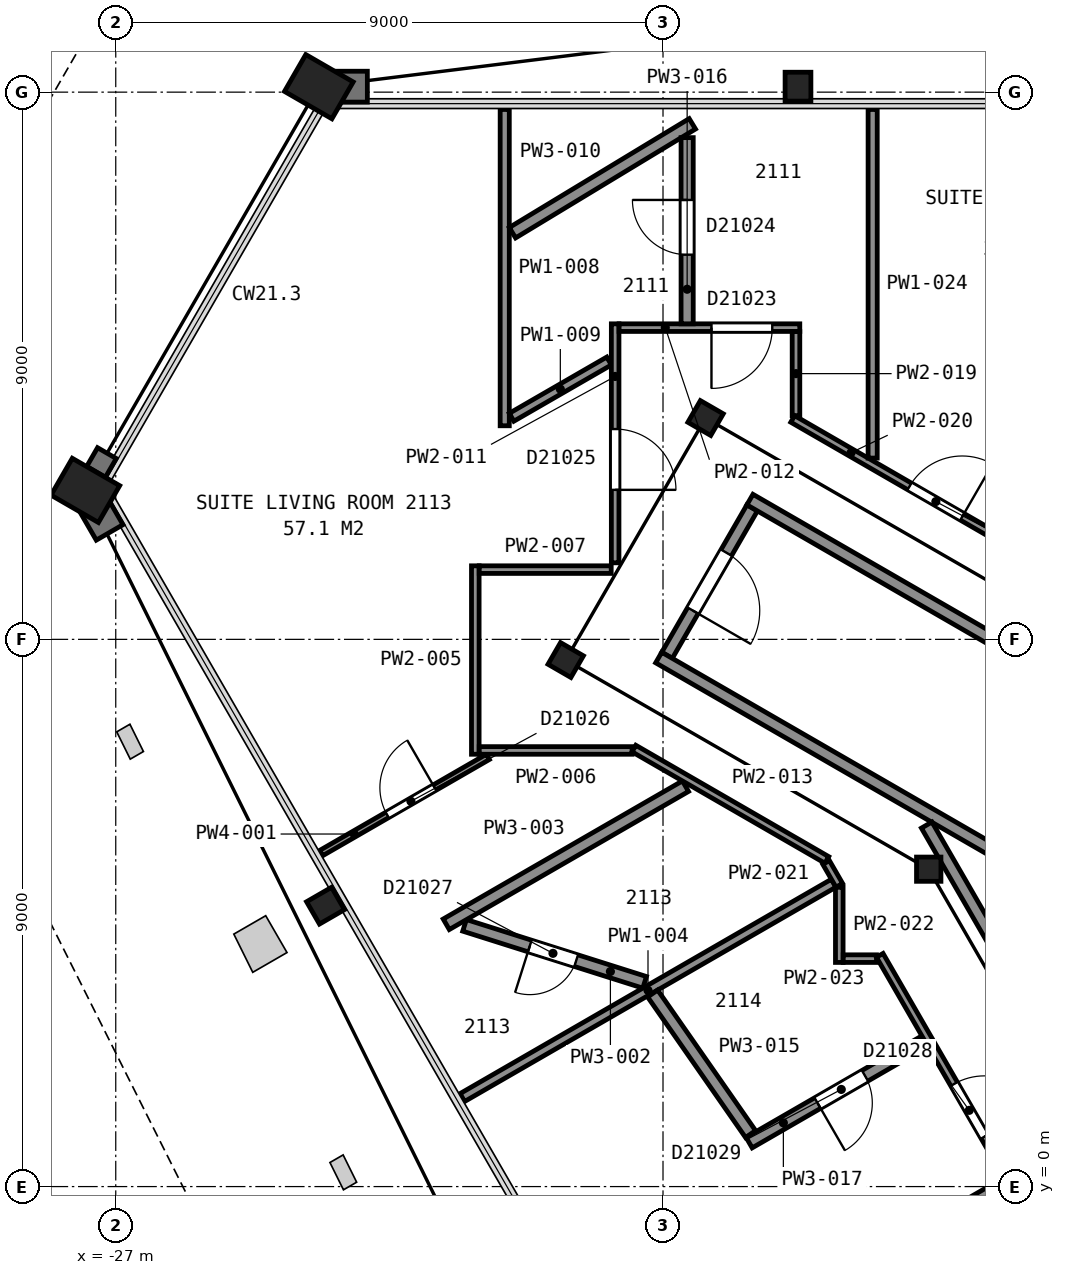
"""IFC4 building model, lengths in metres.
Left out: names, types, materials, properties, quantities, classifications, styles, units other than length and angle.
Written with IfcOpenShell. Run it as: python <this file> out.ifc"""

import sys

from ifc_helpers import new_model, si_unit, direction, frame, frame_2d, origin, origin_2d, place, context, subcontext, project, spatial, rectangle, hollow_rectangle, i_section, extrude, element, fill, save


model = new_model("IFC4")
c1 = context("Model", 3, precision=1e-05, world=origin(), true_north=direction((0.0, 1.0)))
c2 = subcontext(c1, "Body", "Model", "MODEL_VIEW")
j1 = project(units=[si_unit("LENGTHUNIT", "METRE"), si_unit("PLANEANGLEUNIT", "RADIAN")], contexts=[c1])
p1 = place(None, origin())
s1 = spatial("IfcSite", under=j1, at=p1, CompositionType="ELEMENT")
p2 = place(p1, origin())
s2 = spatial("IfcBuilding", under=s1, at=p2, CompositionType="ELEMENT")
p3 = place(p2, frame((0.0, 0.0, 92.8)))
s3 = spatial("IfcBuildingStorey", under=s2, at=p3, CompositionType="ELEMENT", Elevation=92.8)
p4 = place(p3, frame((-15.78, 18.09, 0.0), z_axis=(0.0, 0.0, 1.0), x_axis=(1.0, 0.0, 0.0)))
e1 = element("IfcColumn", 1, at=p4, inside=s3, PredefinedType="COLUMN", context=c2, shape_type="SweptSolid", body=[
    extrude(i_section(OverallWidth=0.424, OverallDepth=0.475, WebThickness=0.048, FlangeThickness=0.077, FilletRadius=0.015, at=origin_2d()), origin(), (0.0, 0.0, 1.0), 3.6),
])
for number, where, z_axis, x_axis in (
    (2, (-23.66, 18.09, 0.0), (0.0, 0.0, 1.0), (0.5, 0.866, 0.0)),
    (3, (-27.5, 11.45, 0.0), (0.0, 0.0, 1.0), (0.5, 0.866, 0.0)),
):
    element("IfcColumn", number, at=place(p3, frame(where, z_axis=z_axis, x_axis=x_axis)), inside=s3, PredefinedType="COLUMN", context=c2, shape_type="SweptSolid", body=[
        extrude(hollow_rectangle(XDim=0.7, YDim=0.9, WallThickness=0.065, at=origin_2d()), origin(), (0.0, 0.0, 1.0), 3.6),
    ])
p5 = place(p3, frame((-23.55, 4.62, 0.0), z_axis=(0.0, 0.0, 1.0), x_axis=(-0.5, 0.866025403784, 0.0)))
e4 = element("IfcColumn", 4, at=p5, inside=s3, PredefinedType="COLUMN", context=c2, shape_type="SweptSolid", body=[
    extrude(i_section(OverallWidth=0.424, OverallDepth=0.475, WebThickness=0.048, FlangeThickness=0.077, FilletRadius=0.015, at=origin_2d()), origin(), (0.0, 0.0, 1.0), 3.6),
])
for number, where, z_axis, x_axis in (
    (5, (-17.3, 12.64, 0.0), (0.0, 0.0, 1.0), (0.5, 0.866, 0.0)),
    (6, (-19.6, 8.66, 0.0), (0.0, 0.0, 1.0), (0.5, 0.866, 0.0)),
):
    element("IfcColumn", number, at=place(p3, frame(where, z_axis=z_axis, x_axis=x_axis)), inside=s3, PredefinedType="COLUMN", context=c2, shape_type="SweptSolid", body=[
        extrude(i_section(OverallWidth=0.411, OverallDepth=0.434, WebThickness=0.036, FlangeThickness=0.057, FilletRadius=0.015, at=origin_2d()), origin(), (0.0, 0.0, 1.0), 3.6),
    ])
p6 = place(p3, frame((-13.63, 5.22, 0.0), z_axis=(0.0, 0.0, 1.0), x_axis=(1.0, 0.0, 0.0)))
e7 = element("IfcColumn", 7, at=p6, inside=s3, PredefinedType="COLUMN", context=c2, shape_type="SweptSolid", body=[
    extrude(i_section(OverallWidth=0.401, OverallDepth=0.399, WebThickness=0.025, FlangeThickness=0.04, FilletRadius=0.015, at=origin_2d()), origin(), (0.0, 0.0, 1.0), 3.6),
])
p7 = place(p3, frame((-16.534, 11.162, 0.0), z_axis=(0.0, 0.0, 1.0), x_axis=(-0.49998411664, -0.866034573852, 0.0)))
e8 = element("IfcWall", 8, at=p7, inside=s3, PredefinedType="PARTITIONING", context=c2, shape_type="SweptSolid", body=[
    extrude(rectangle(XDim=2.8, YDim=0.2, at=frame_2d((1.4, 0.0))), origin(), (0.0, 0.0, 1.0), 3.35),
])
p8 = place(p7, frame((0.85, 0.0, 0.0)))
e9 = element("IfcOpeningElement", 9, at=p8, cuts=e8, PredefinedType="OPENING", context=c2, shape_type="SweptSolid", body=[
    extrude(rectangle(XDim=1.1, YDim=2.1, at=frame_2d((0.55, 1.05))), frame((0.0, 0.11, 0.0), z_axis=(0.0, -1.0, 0.0), x_axis=(1.0, 0.0, 0.0)), (0.0, 0.0, 1.0), 0.22),
])
for number, where, z_axis, x_axis in (
    (10, (-7.678, 2.701, 0.0), (0.0, 0.0, 1.0), (-0.866, 0.5, 0.0)),
    (11, (-6.178, 5.299, 0.0), (0.0, 0.0, 1.0), (-0.866, 0.5, 0.0)),
):
    element("IfcWall", number, at=place(p3, frame(where, z_axis=z_axis, x_axis=x_axis)), inside=s3, PredefinedType="PARTITIONING", context=c2, shape_type="SweptSolid", body=[
        extrude(rectangle(XDim=12.0, YDim=0.2, at=frame_2d((6.0, 0.0))), origin(), (0.0, 0.0, 1.0), 3.35),
    ])
p9 = place(p3, frame((-13.664, 5.946, 0.0), z_axis=(0.0, 0.0, 1.0), x_axis=(0.499994327219, -0.866028678941, 0.0)))
e12 = element("IfcWall", 12, at=p9, inside=s3, PredefinedType="PARTITIONING", context=c2, shape_type="SweptSolid", body=[
    extrude(rectangle(XDim=23.968, YDim=0.2, at=frame_2d((11.984, 0.0))), origin(), (0.0, 0.0, 1.0), 3.35),
])
p10 = place(p3, frame((-20.88, 7.067, 0.0), z_axis=(0.0, 0.0, 1.0), x_axis=(-0.866127794624, -0.499822611913, 0.0)))
e13 = element("IfcWall", 13, at=p10, inside=s3, PredefinedType="PARTITIONING", context=c2, shape_type="SweptSolid", body=[
    extrude(rectangle(XDim=3.165, YDim=0.1, at=frame_2d((1.583, 0.0))), origin(), (0.0, 0.0, 1.0), 2.613),
])
p11 = place(p10, frame((1.011, 0.0, 0.0)))
e14 = element("IfcOpeningElement", 14, at=p11, cuts=e13, PredefinedType="OPENING", context=c2, shape_type="SweptSolid", body=[
    extrude(rectangle(XDim=0.9, YDim=2.1, at=frame_2d((0.45, 1.05))), frame((0.0, 0.06, 0.0), z_axis=(0.0, -1.0, 0.0), x_axis=(1.0, 0.0, 0.0)), (0.0, 0.0, 1.0), 0.12),
])
p12 = place(p3, frame((-21.263, 4.296, 0.0), z_axis=(0.0, 0.0, 1.0), x_axis=(0.95341383314, -0.301665481582, 0.0)))
e15 = element("IfcWall", 15, at=p12, inside=s3, PredefinedType="PARTITIONING", context=c2, shape_type="SweptSolid", body=[
    extrude(rectangle(XDim=3.106, YDim=0.2, at=frame_2d((1.553, 0.0))), origin(), (0.0, 0.0, 1.0), 2.613),
])
p13 = place(p12, frame((1.125, 0.0, 0.0)))
e16 = element("IfcOpeningElement", 16, at=p13, cuts=e15, PredefinedType="OPENING", context=c2, shape_type="SweptSolid", body=[
    extrude(rectangle(XDim=0.8, YDim=2.1, at=frame_2d((0.4, 1.05))), frame((0.0, 0.11, 0.0), z_axis=(0.0, -1.0, 0.0), x_axis=(1.0, 0.0, 0.0)), (0.0, 0.0, 1.0), 0.22),
])
p14 = place(p3, frame((-21.565, 4.314, 0.0), z_axis=(0.0, 0.0, 1.0), x_axis=(0.866058501026, 0.499942669514, 0.0)))
e17 = element("IfcWall", 17, at=p14, inside=s3, PredefinedType="PARTITIONING", context=c2, shape_type="SweptSolid", body=[
    extrude(rectangle(XDim=4.542, YDim=0.2, at=frame_2d((2.271, 0.0))), origin(), (0.0, 0.0, 1.0), 2.613),
])
p15 = place(p3, frame((-21.301, 1.464, 0.0), z_axis=(0.0, 0.0, 1.0), x_axis=(0.866055299146, 0.49994821614, 0.0)))
e18 = element("IfcWall", 18, at=p15, inside=s3, PredefinedType="PARTITIONING", context=c2, shape_type="SweptSolid", body=[
    extrude(rectangle(XDim=7.052, YDim=0.15, at=frame_2d((3.526, 0.0))), origin(), (0.0, 0.0, 1.0), 2.613),
])
p16 = place(p3, frame((-21.087, 7.111, 0.0), z_axis=(0.0, 0.0, 1.0), x_axis=(0.0, 1.0, 0.0)))
e19 = element("IfcWall", 19, at=p16, inside=s3, PredefinedType="PARTITIONING", context=c2, shape_type="SweptSolid", body=[
    extrude(rectangle(XDim=3.099, YDim=0.125, at=frame_2d((1.549, 0.0))), origin(), (0.0, 0.0, 1.0), 2.613),
])
p17 = place(p3, frame((-21.022, 7.173, 0.0), z_axis=(0.0, 0.0, 1.0), x_axis=(1.0, 0.0, 0.0)))
e20 = element("IfcWall", 20, at=p17, inside=s3, PredefinedType="PARTITIONING", context=c2, shape_type="SweptSolid", body=[
    extrude(rectangle(XDim=2.513, YDim=0.125, at=frame_2d((1.256, 0.0))), origin(), (0.0, 0.0, 1.0), 2.613),
])
p18 = place(p3, frame((-21.022, 10.147, 0.0), z_axis=(0.0, 0.0, 1.0), x_axis=(1.0, 0.0, 0.0)))
e21 = element("IfcWall", 21, at=p18, inside=s3, PredefinedType="PARTITIONING", context=c2, shape_type="SweptSolid", body=[
    extrude(rectangle(XDim=2.17, YDim=0.125, at=frame_2d((1.085, 0.0))), origin(), (0.0, 0.0, 1.0), 2.613),
])
p19 = place(p3, frame((-20.603, 12.513, 0.0), z_axis=(0.0, 0.0, 1.0), x_axis=(0.0, 1.0, 0.0)))
e22 = element("IfcWall", 22, at=p19, inside=s3, PredefinedType="PARTITIONING", context=c2, shape_type="SweptSolid", body=[
    extrude(rectangle(XDim=5.202, YDim=0.15, at=frame_2d((2.601, 0.0))), origin(), (0.0, 0.0, 1.0), 2.613),
])
p20 = place(p3, frame((-20.49, 12.653, 0.0), z_axis=(0.0, 0.0, 1.0), x_axis=(0.866141673836, 0.499798560267, 0.0)))
e23 = element("IfcWall", 23, at=p20, inside=s3, PredefinedType="PARTITIONING", context=c2, shape_type="SweptSolid", body=[
    extrude(rectangle(XDim=1.851, YDim=0.15, at=frame_2d((0.926, 0.0))), origin(), (0.0, 0.0, 1.0), 2.613),
])
p21 = place(p3, frame((-20.476, 15.688, 0.0), z_axis=(0.0, 0.0, 1.0), x_axis=(0.855493496237, 0.517813555148, 0.0)))
e24 = element("IfcWall", 24, at=p21, inside=s3, PredefinedType="PARTITIONING", context=c2, shape_type="SweptSolid", body=[
    extrude(rectangle(XDim=3.459, YDim=0.2, at=frame_2d((1.729, 0.0))), origin(), (0.0, 0.0, 1.0), 2.613),
])
p22 = place(p3, frame((-18.787, 10.259, 0.0), z_axis=(0.0, 0.0, 1.0), x_axis=(0.0, 1.0, 0.0)))
e25 = element("IfcWall", 25, at=p22, inside=s3, PredefinedType="PARTITIONING", context=c2, shape_type="SweptSolid", body=[
    extrude(rectangle(XDim=3.93, YDim=0.125, at=frame_2d((1.965, 0.0))), origin(), (0.0, 0.0, 1.0), 2.613),
])
p23 = place(p22, frame((1.2, 0.0, 0.0)))
e26 = element("IfcOpeningElement", 26, at=p23, cuts=e25, PredefinedType="OPENING", context=c2, shape_type="SweptSolid", body=[
    extrude(rectangle(XDim=1.0, YDim=2.1, at=frame_2d((0.5, 1.05))), frame((0.0, 0.073, 0.0), z_axis=(0.0, -1.0, 0.0), x_axis=(1.0, 0.0, 0.0)), (0.0, 0.0, 1.0), 0.145),
])
p24 = place(p3, frame((-18.722, 14.127, 0.0), z_axis=(0.0, 0.0, 1.0), x_axis=(1.0, 0.0, 0.0)))
e27 = element("IfcWall", 27, at=p24, inside=s3, PredefinedType="PARTITIONING", context=c2, shape_type="SweptSolid", body=[
    extrude(rectangle(XDim=2.971, YDim=0.125, at=frame_2d((1.486, 0.0))), origin(), (0.0, 0.0, 1.0), 2.613),
])
p25 = place(p24, frame((1.519, 0.0, 0.0)))
e28 = element("IfcOpeningElement", 28, at=p25, cuts=e27, PredefinedType="OPENING", context=c2, shape_type="SweptSolid", body=[
    extrude(rectangle(XDim=1.0, YDim=2.1, at=frame_2d((0.5, 1.05))), frame((0.0, 0.073, 0.0), z_axis=(0.0, -1.0, 0.0), x_axis=(1.0, 0.0, 0.0)), (0.0, 0.0, 1.0), 0.145),
])
p26 = place(p3, frame((-18.478, 7.204, 0.0), z_axis=(0.0, 0.0, 1.0), x_axis=(0.866011320536, -0.500024392108, 0.0)))
e29 = element("IfcWall", 29, at=p26, inside=s3, PredefinedType="PARTITIONING", context=c2, shape_type="SweptSolid", body=[
    extrude(rectangle(XDim=3.663, YDim=0.125, at=frame_2d((1.832, 0.0))), origin(), (0.0, 0.0, 1.0), 2.613),
])
p27 = place(p3, frame((-18.466, -3.445, 0.0), z_axis=(0.0, 0.0, 1.0), x_axis=(0.86605175433, 0.499954356739, 0.0)))
e30 = element("IfcWall", 30, at=p27, inside=s3, PredefinedType="PARTITIONING", context=c2, shape_type="SweptSolid", body=[
    extrude(rectangle(XDim=7.048, YDim=0.15, at=frame_2d((3.524, 0.0))), origin(), (0.0, 0.0, 1.0), 2.613),
])
p28 = place(p3, frame((-18.17, 3.175, 0.0), z_axis=(0.0, 0.0, 1.0), x_axis=(0.571541682724, -0.820573034476, 0.0)))
e31 = element("IfcWall", 31, at=p28, inside=s3, PredefinedType="PARTITIONING", context=c2, shape_type="SweptSolid", body=[
    extrude(rectangle(XDim=2.818, YDim=0.2, at=frame_2d((1.409, 0.0))), origin(), (0.0, 0.0, 1.0), 2.613),
])
p29 = place(p3, frame((-17.603, 14.189, 0.0), z_axis=(0.0, 0.0, 1.0), x_axis=(0.0, 1.0, 0.0)))
e32 = element("IfcWall", 32, at=p29, inside=s3, PredefinedType="PARTITIONING", context=c2, shape_type="SweptSolid", body=[
    extrude(rectangle(XDim=3.062, YDim=0.2, at=frame_2d((1.531, 0.0))), origin(), (0.0, 0.0, 1.0), 2.613),
])
p30 = place(p29, frame((1.137, 0.0, 0.0)))
e33 = element("IfcOpeningElement", 33, at=p30, cuts=e32, PredefinedType="OPENING", context=c2, shape_type="SweptSolid", body=[
    extrude(rectangle(XDim=0.9, YDim=2.1, at=frame_2d((0.45, 1.05))), frame((0.0, 0.11, 0.0), z_axis=(0.0, -1.0, 0.0), x_axis=(1.0, 0.0, 0.0)), (0.0, 0.0, 1.0), 0.22),
])
p31 = place(p3, frame((-16.583, 0.723, 0.0), z_axis=(0.0, 0.0, 1.0), x_axis=(0.866001642064, 0.500041154249, 0.0)))
e34 = element("IfcWall", 34, at=p31, inside=s3, PredefinedType="PARTITIONING", context=c2, shape_type="SweptSolid", body=[
    extrude(rectangle(XDim=3.338, YDim=0.2, at=frame_2d((1.669, 0.0))), origin(), (0.0, 0.0, 1.0), 2.613),
])
p32 = place(p31, frame((1.3, 0.0, 0.0)))
e35 = element("IfcOpeningElement", 35, at=p32, cuts=e34, PredefinedType="OPENING", context=c2, shape_type="SweptSolid", body=[
    extrude(rectangle(XDim=0.9, YDim=2.1, at=frame_2d((0.45, 1.05))), frame((0.0, 0.11, 0.0), z_axis=(0.0, -1.0, 0.0), x_axis=(1.0, 0.0, 0.0)), (0.0, 0.0, 1.0), 0.22),
])
p33 = place(p3, frame((-15.813, 12.679, 0.0), z_axis=(0.0, 0.0, 1.0), x_axis=(0.0, 1.0, 0.0)))
e36 = element("IfcWall", 36, at=p33, inside=s3, PredefinedType="PARTITIONING", context=c2, shape_type="SweptSolid", body=[
    extrude(rectangle(XDim=1.383, YDim=0.125, at=frame_2d((0.691, 0.0))), origin(), (0.0, 0.0, 1.0), 2.613),
])
p34 = place(p3, frame((-15.867, 12.625, 0.0), z_axis=(0.0, 0.0, 1.0), x_axis=(0.86603035395, -0.499991425964, 0.0)))
e37 = element("IfcWall", 37, at=p34, inside=s3, PredefinedType="PARTITIONING", context=c2, shape_type="SweptSolid", body=[
    extrude(rectangle(XDim=3.824, YDim=0.125, at=frame_2d((1.912, 0.0))), origin(), (0.0, 0.0, 1.0), 2.613),
])
p35 = place(p34, frame((2.219, 0.0, 0.0)))
e38 = element("IfcOpeningElement", 38, at=p35, cuts=e37, PredefinedType="OPENING", context=c2, shape_type="SweptSolid", body=[
    extrude(rectangle(XDim=1.0, YDim=2.1, at=frame_2d((0.5, 1.05))), frame((0.0, 0.073, 0.0), z_axis=(0.0, -1.0, 0.0), x_axis=(1.0, 0.0, 0.0)), (0.0, 0.0, 1.0), 0.145),
])
p36 = place(p3, frame((-15.318, 5.33, 0.0), z_axis=(0.0, 0.0, 1.0), x_axis=(0.499836277606, -0.86611990832, 0.0)))
e39 = element("IfcWall", 39, at=p36, inside=s3, PredefinedType="PARTITIONING", context=c2, shape_type="SweptSolid", body=[
    extrude(rectangle(XDim=0.433, YDim=0.125, at=frame_2d((0.217, 0.0))), origin(), (0.0, 0.0, 1.0), 2.613),
])
p37 = place(p3, frame((-15.101, 3.687, 0.0), z_axis=(0.0, 0.0, 1.0), x_axis=(0.0, 1.0, 0.0)))
e40 = element("IfcWall", 40, at=p37, inside=s3, PredefinedType="PARTITIONING", context=c2, shape_type="SweptSolid", body=[
    extrude(rectangle(XDim=1.236, YDim=0.125, at=frame_2d((0.618, 0.0))), origin(), (0.0, 0.0, 1.0), 2.613),
])
p38 = place(p3, frame((-15.036, 3.749, 0.0), z_axis=(0.0, 0.0, 1.0), x_axis=(1.0, 0.0, 0.0)))
e41 = element("IfcWall", 41, at=p38, inside=s3, PredefinedType="PARTITIONING", context=c2, shape_type="SweptSolid", body=[
    extrude(rectangle(XDim=0.547, YDim=0.125, at=frame_2d((0.273, 0.0))), origin(), (0.0, 0.0, 1.0), 2.613),
])
p39 = place(p3, frame((-14.552, 11.981, 0.0), z_axis=(0.0, 0.0, 1.0), x_axis=(0.0, 1.0, 0.0)))
e42 = element("IfcWall", 42, at=p39, inside=s3, PredefinedType="PARTITIONING", context=c2, shape_type="SweptSolid", body=[
    extrude(rectangle(XDim=5.734, YDim=0.15, at=frame_2d((2.867, 0.0))), origin(), (0.0, 0.0, 1.0), 2.613),
])
p40 = place(p3, frame((-9.41, -4.902, 0.0), z_axis=(0.0, 0.0, 1.0), x_axis=(-0.499971244726, 0.866042005013, 0.0)))
e43 = element("IfcWall", 43, at=p40, inside=s3, PredefinedType="PARTITIONING", context=c2, shape_type="SweptSolid", body=[
    extrude(rectangle(XDim=10.052, YDim=0.125, at=frame_2d((5.026, 0.0))), origin(), (0.0, 0.0, 1.0), 2.613),
])
p41 = place(p40, frame((6.608, 0.0, 0.0)))
e44 = element("IfcOpeningElement", 44, at=p41, cuts=e43, PredefinedType="OPENING", context=c2, shape_type="SweptSolid", body=[
    extrude(rectangle(XDim=1.0, YDim=2.1, at=frame_2d((0.5, 1.05))), frame((0.0, 0.073, 0.0), z_axis=(0.0, -1.0, 0.0), x_axis=(1.0, 0.0, 0.0)), (0.0, 0.0, 1.0), 0.145),
])
p42 = place(p40, frame((2.989, 0.0, 0.0)))
e45 = element("IfcOpeningElement", 45, at=p42, cuts=e43, PredefinedType="OPENING", context=c2, shape_type="SweptSolid", body=[
    extrude(rectangle(XDim=1.0, YDim=2.1, at=frame_2d((0.5, 1.05))), frame((0.0, 0.073, 0.0), z_axis=(0.0, -1.0, 0.0), x_axis=(1.0, 0.0, 0.0)), (0.0, 0.0, 1.0), 0.145),
])
p43 = place(p8, origin())
e46 = element("IfcDoor", 46, at=p43, inside=s3, OperationType="SINGLE_SWING_RIGHT", PredefinedType="DOOR", context=c2, shape_type="SweptSolid", body=[
    extrude(rectangle(XDim=1.1, YDim=2.1, at=frame_2d((0.55, 1.05))), frame((0.0, 0.025, 0.0), z_axis=(0.0, -1.0, 0.0), x_axis=(1.0, 0.0, 0.0)), (0.0, 0.0, 1.0), 0.05),
])
fill(e9, e46)
p44 = place(p11, origin())
e47 = element("IfcDoor", 47, at=p44, inside=s3, OperationType="SINGLE_SWING_LEFT", PredefinedType="DOOR", context=c2, shape_type="SweptSolid", body=[
    extrude(rectangle(XDim=0.9, YDim=2.1, at=frame_2d((0.45, 1.05))), frame((0.0, 0.025, 0.0), z_axis=(0.0, -1.0, 0.0), x_axis=(1.0, 0.0, 0.0)), (0.0, 0.0, 1.0), 0.05),
])
fill(e14, e47)
p45 = place(p13, origin())
e48 = element("IfcDoor", 48, at=p45, inside=s3, OperationType="SINGLE_SWING_LEFT", PredefinedType="DOOR", context=c2, shape_type="SweptSolid", body=[
    extrude(rectangle(XDim=0.8, YDim=2.1, at=frame_2d((0.4, 1.05))), frame((0.0, 0.025, 0.0), z_axis=(0.0, -1.0, 0.0), x_axis=(1.0, 0.0, 0.0)), (0.0, 0.0, 1.0), 0.05),
])
fill(e16, e48)
p46 = place(p23, origin())
e49 = element("IfcDoor", 49, at=p46, inside=s3, OperationType="SINGLE_SWING_LEFT", PredefinedType="DOOR", context=c2, shape_type="SweptSolid", body=[
    extrude(rectangle(XDim=1.0, YDim=2.1, at=frame_2d((0.5, 1.05))), frame((0.0, 0.025, 0.0), z_axis=(0.0, -1.0, 0.0), x_axis=(1.0, 0.0, 0.0)), (0.0, 0.0, 1.0), 0.05),
])
fill(e26, e49)
p47 = place(p25, origin())
e50 = element("IfcDoor", 50, at=p47, inside=s3, OperationType="SINGLE_SWING_LEFT", PredefinedType="DOOR", context=c2, shape_type="SweptSolid", body=[
    extrude(rectangle(XDim=1.0, YDim=2.1, at=frame_2d((0.5, 1.05))), frame((0.0, 0.025, 0.0), z_axis=(0.0, -1.0, 0.0), x_axis=(1.0, 0.0, 0.0)), (0.0, 0.0, 1.0), 0.05),
])
fill(e28, e50)
p48 = place(p30, origin())
e51 = element("IfcDoor", 51, at=p48, inside=s3, OperationType="SINGLE_SWING_RIGHT", PredefinedType="DOOR", context=c2, shape_type="SweptSolid", body=[
    extrude(rectangle(XDim=0.9, YDim=2.1, at=frame_2d((0.45, 1.05))), frame((0.0, 0.025, 0.0), z_axis=(0.0, -1.0, 0.0), x_axis=(1.0, 0.0, 0.0)), (0.0, 0.0, 1.0), 0.05),
])
fill(e33, e51)
p49 = place(p32, origin())
e52 = element("IfcDoor", 52, at=p49, inside=s3, OperationType="SINGLE_SWING_LEFT", PredefinedType="DOOR", context=c2, shape_type="SweptSolid", body=[
    extrude(rectangle(XDim=0.9, YDim=2.1, at=frame_2d((0.45, 1.05))), frame((0.0, 0.025, 0.0), z_axis=(0.0, -1.0, 0.0), x_axis=(1.0, 0.0, 0.0)), (0.0, 0.0, 1.0), 0.05),
])
fill(e35, e52)
p50 = place(p35, origin())
e53 = element("IfcDoor", 53, at=p50, inside=s3, OperationType="SINGLE_SWING_RIGHT", PredefinedType="DOOR", context=c2, shape_type="SweptSolid", body=[
    extrude(rectangle(XDim=1.0, YDim=2.1, at=frame_2d((0.5, 1.05))), frame((0.0, 0.025, 0.0), z_axis=(0.0, -1.0, 0.0), x_axis=(1.0, 0.0, 0.0)), (0.0, 0.0, 1.0), 0.05),
])
fill(e38, e53)
p51 = place(p41, origin())
e54 = element("IfcDoor", 54, at=p51, inside=s3, OperationType="SINGLE_SWING_LEFT", PredefinedType="DOOR", context=c2, shape_type="SweptSolid", body=[
    extrude(rectangle(XDim=1.0, YDim=2.1, at=frame_2d((0.5, 1.05))), frame((0.0, 0.025, 0.0), z_axis=(0.0, -1.0, 0.0), x_axis=(1.0, 0.0, 0.0)), (0.0, 0.0, 1.0), 0.05),
])
fill(e44, e54)
save(model, sys.argv[1])
